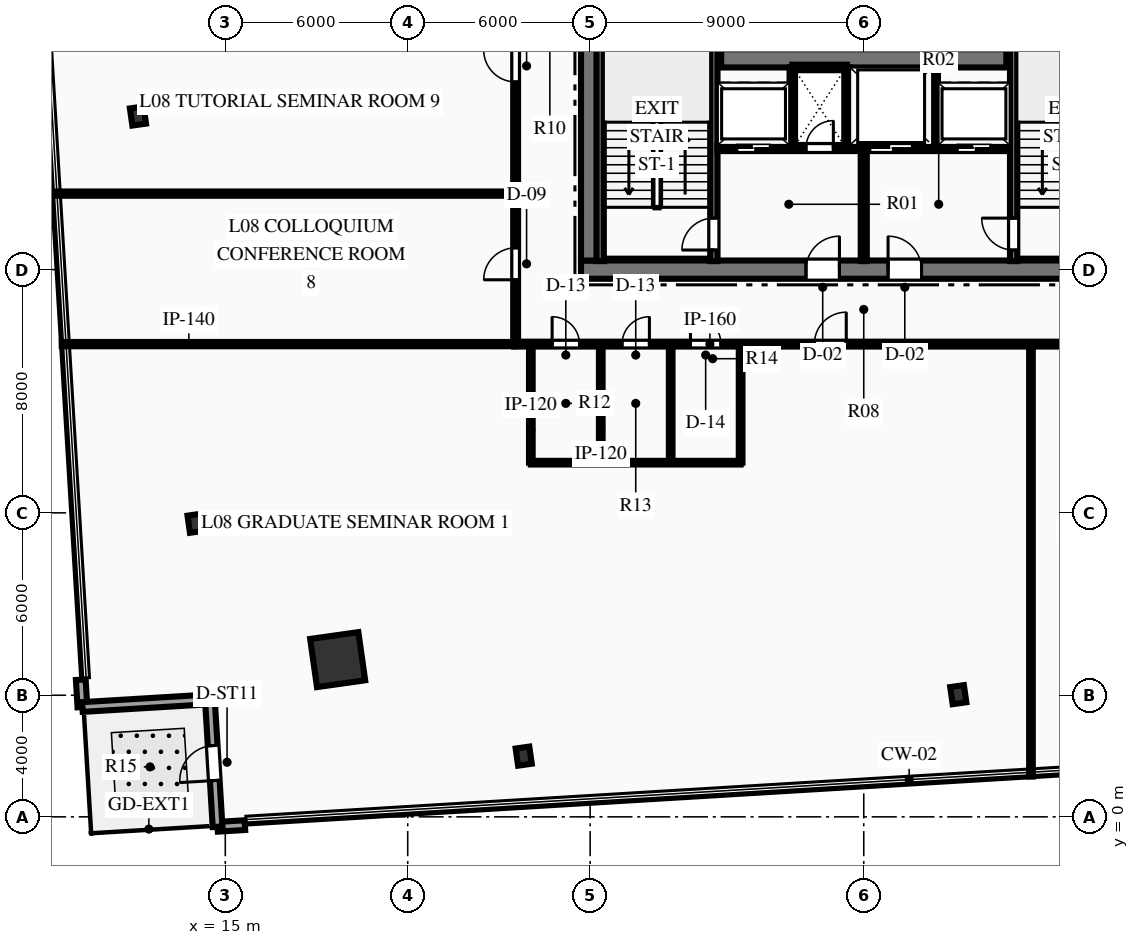
"""IFC4 building model, lengths in metres.
Left out: names, types, materials, properties, quantities, classifications, styles, units other than length and angle.
Written with IfcOpenShell. Run it as: python <this file> out.ifc"""

import sys

from ifc_helpers import new_model, si_unit, direction, frame, frame_2d, origin, origin_2d, place, context, subcontext, project, spatial, rectangle, hollow_rectangle, i_section, extrude, element, fill, save


model = new_model("IFC4")
c1 = context("Model", 3, precision=1e-05, world=origin(), true_north=direction((0.0, 1.0)))
c2 = subcontext(c1, "Body", "Model", "MODEL_VIEW")
j1 = project(units=[si_unit("LENGTHUNIT", "METRE"), si_unit("PLANEANGLEUNIT", "RADIAN")], contexts=[c1])
p1 = place(None, origin())
s1 = spatial("IfcSite", under=j1, at=p1, CompositionType="ELEMENT")
p2 = place(p1, origin())
s2 = spatial("IfcBuilding", under=s1, at=p2, CompositionType="ELEMENT")
p3 = place(p2, frame((0.0, 0.0, 40.2)))
s3 = spatial("IfcBuildingStorey", under=s2, at=p3, CompositionType="ELEMENT", Elevation=40.2)
p4 = place(p3, frame((26.7, 18.0, 0.0), z_axis=(0.0, 0.0, 1.0), x_axis=(1.0, 0.0, 0.0)))
e1 = element("IfcWall", 1, at=p4, inside=s3, PredefinedType="SHEAR", context=c2, shape_type="SweptSolid", body=[
    extrude(rectangle(XDim=18.6, YDim=0.6, at=frame_2d((9.3, 0.0))), origin(), (0.0, 0.0, 1.0), 3.75),
])
p5 = place(p4, frame((7.4, 0.0, 0.0)))
e2 = element("IfcOpeningElement", 2, at=p5, cuts=e1, PredefinedType="OPENING", context=c2, shape_type="SweptSolid", body=[
    extrude(rectangle(XDim=1.1, YDim=2.15, at=frame_2d((0.55, 1.075))), frame((0.0, 0.31, 0.0), z_axis=(0.0, -1.0, 0.0), x_axis=(1.0, 0.0, 0.0)), (0.0, 0.0, 1.0), 0.62),
])
p6 = place(p4, frame((10.1, 0.0, 0.0)))
e3 = element("IfcOpeningElement", 3, at=p6, cuts=e1, PredefinedType="OPENING", context=c2, shape_type="SweptSolid", body=[
    extrude(rectangle(XDim=1.1, YDim=2.15, at=frame_2d((0.55, 1.075))), frame((0.0, 0.31, 0.0), z_axis=(0.0, -1.0, 0.0), x_axis=(1.0, 0.0, 0.0)), (0.0, 0.0, 1.0), 0.62),
])
p7 = place(p3, frame((27.0, 18.3, 0.0), z_axis=(0.0, 0.0, 1.0), x_axis=(0.0, 1.0, 0.0)))
e4 = element("IfcWall", 4, at=p7, inside=s3, PredefinedType="SHEAR", context=c2, shape_type="SweptSolid", body=[
    extrude(rectangle(XDim=15.4, YDim=0.6, at=frame_2d((7.7, 0.0))), origin(), (0.0, 0.0, 1.0), 3.75),
])
p8 = place(p7, frame((9.94, 0.0, 0.0)))
e5 = element("IfcOpeningElement", 5, at=p8, cuts=e4, PredefinedType="OPENING", context=c2, shape_type="SweptSolid", body=[
    extrude(rectangle(XDim=1.4, YDim=2.2, at=frame_2d((0.7, 1.1))), frame((0.0, 0.31, 0.0), z_axis=(0.0, -1.0, 0.0), x_axis=(1.0, 0.0, 0.0)), (0.0, 0.0, 1.0), 0.62),
])
p9 = place(p3, frame((31.31, 24.95, 0.0), z_axis=(0.0, 0.0, 1.0), x_axis=(1.0, 0.0, 0.0)))
e6 = element("IfcWall", 6, at=p9, inside=s3, PredefinedType="SHEAR", context=c2, shape_type="SweptSolid", body=[
    extrude(rectangle(XDim=9.38, YDim=0.6, at=frame_2d((4.69, 0.0))), origin(), (0.0, 0.0, 1.0), 3.75),
])
p10 = place(p3, frame((31.07, 18.28, 0.0), z_axis=(0.0, 0.0, 1.0), x_axis=(0.0, 1.0, 0.0)))
e7 = element("IfcWall", 7, at=p10, inside=s3, PredefinedType="SHEAR", context=c2, shape_type="SweptSolid", body=[
    extrude(rectangle(XDim=8.26, YDim=0.24, at=frame_2d((4.13, 0.0))), origin(), (0.0, 0.0, 1.0), 3.75),
])
p11 = place(p10, frame((0.365, 0.0, 0.0)))
e8 = element("IfcOpeningElement", 8, at=p11, cuts=e7, PredefinedType="OPENING", context=c2, shape_type="SweptSolid", body=[
    extrude(rectangle(XDim=1.05, YDim=2.15, at=frame_2d((0.525, 1.075))), frame((0.0, 0.13, 0.0), z_axis=(0.0, -1.0, 0.0), x_axis=(1.0, 0.0, 0.0)), (0.0, 0.0, 1.0), 0.26),
])
p12 = place(p3, frame((27.33, 18.28, 0.0), z_axis=(0.0, 0.0, 1.0), x_axis=(0.0, 1.0, 0.0)))
e9 = element("IfcWall", 9, at=p12, inside=s3, PredefinedType="SHEAR", context=c2, shape_type="SweptSolid", body=[
    extrude(rectangle(XDim=8.26, YDim=0.24, at=frame_2d((4.13, 0.0))), origin(), (0.0, 0.0, 1.0), 3.75),
])
p13 = place(p3, frame((40.93, 18.28, 0.0), z_axis=(0.0, 0.0, 1.0), x_axis=(0.0, 1.0, 0.0)))
e10 = element("IfcWall", 10, at=p13, inside=s3, PredefinedType="SHEAR", context=c2, shape_type="SweptSolid", body=[
    extrude(rectangle(XDim=8.26, YDim=0.24, at=frame_2d((4.13, 0.0))), origin(), (0.0, 0.0, 1.0), 3.75),
])
p14 = place(p13, frame((0.365, 0.0, 0.0)))
e11 = element("IfcOpeningElement", 11, at=p14, cuts=e10, PredefinedType="OPENING", context=c2, shape_type="SweptSolid", body=[
    extrude(rectangle(XDim=1.05, YDim=2.15, at=frame_2d((0.525, 1.075))), frame((0.0, 0.13, 0.0), z_axis=(0.0, -1.0, 0.0), x_axis=(1.0, 0.0, 0.0)), (0.0, 0.0, 1.0), 0.26),
])
p15 = place(p3, frame((18.696, 5.172, 0.0), z_axis=(0.0, 0.0, 1.0), x_axis=(0.990146240249, 0.140037219771, 0.0)))
e12 = element("IfcColumn", 12, at=p15, inside=s3, PredefinedType="COLUMN", context=c2, shape_type="SweptSolid", body=[
    extrude(hollow_rectangle(XDim=1.6, YDim=1.6, WallThickness=0.08, at=origin_2d()), origin(), (0.0, 0.0, 1.0), 3.75),
])
for number, where, z_axis, x_axis in (
    (13, (24.815, 1.997, 0.0), (0.0, 0.0, 1.0), (0.99, 0.14, 0.0)),
    (14, (39.109, 4.019, 0.0), (0.0, 0.0, 1.0), (0.99, 0.14, 0.0)),
    (15, (12.127, 23.053, 0.0), (0.0, 0.0, 1.0), (0.99, 0.14, 0.0)),
    (16, (14.022, 9.657, 0.0), (0.0, 0.0, 1.0), (0.99, 0.14, 0.0)),
):
    element("IfcColumn", number, at=place(p3, frame(where, z_axis=z_axis, x_axis=x_axis)), inside=s3, PredefinedType="COLUMN", context=c2, shape_type="SweptSolid", body=[
        extrude(i_section(OverallWidth=0.454, OverallDepth=0.569, WebThickness=0.078, FlangeThickness=0.125, at=origin_2d()), origin(), (0.0, 0.0, 1.0), 3.75),
    ])
for number, where, z_axis, x_axis in (
    (17, (15.644, -0.272, 0.0), (0.0, 0.0, 1.0), (-0.998, -0.06, 0.0)),
    (18, (10.301, 3.613, 0.0), (0.0, 0.0, 1.0), (-0.06, 0.998, 0.0)),
):
    element("IfcWall", number, at=place(p3, frame(where, z_axis=z_axis, x_axis=x_axis)), inside=s3, PredefinedType="STANDARD", context=c2, shape_type="SweptSolid", body=[
        extrude(rectangle(XDim=0.9, YDim=0.32, at=frame_2d((0.45, 0.0))), origin(), (0.0, 0.0, 1.0), 3.44),
    ])
p16 = place(p3, frame((14.493, 3.865, 0.0), z_axis=(0.0, 0.0, 1.0), x_axis=(-0.998188544632, -0.060163355677, 0.0)))
e19 = element("IfcWall", 19, at=p16, inside=s3, PredefinedType="STANDARD", context=c2, shape_type="SweptSolid", body=[
    extrude(rectangle(XDim=4.2, YDim=0.32, at=frame_2d((2.1, 0.0))), origin(), (0.0, 0.0, 1.0), 3.44),
])
p17 = place(p3, frame((14.746, -0.327, 0.0), z_axis=(0.0, 0.0, 1.0), x_axis=(-0.060224768245, 0.998184841244, 0.0)))
e20 = element("IfcWall", 20, at=p17, inside=s3, PredefinedType="STANDARD", context=c2, shape_type="SweptSolid", body=[
    extrude(rectangle(XDim=4.2, YDim=0.32, at=frame_2d((2.1, 0.0))), origin(), (0.0, 0.0, 1.0), 3.44),
])
p18 = place(p17, frame((1.525, 0.0, 0.0)))
e21 = element("IfcOpeningElement", 21, at=p18, cuts=e20, PredefinedType="OPENING", context=c2, shape_type="SweptSolid", body=[
    extrude(rectangle(XDim=1.15, YDim=2.2, at=frame_2d((0.575, 1.1))), frame((0.0, 0.17, 0.0), z_axis=(0.0, -1.0, 0.0), x_axis=(1.0, 0.0, 0.0)), (0.0, 0.0, 1.0), 0.34),
])
p19 = place(p3, frame((36.0, 18.28, 0.0), z_axis=(0.0, 0.0, 1.0), x_axis=(0.0, 1.0, 0.0)))
e22 = element("IfcWall", 22, at=p19, inside=s3, PredefinedType="PARTITIONING", context=c2, shape_type="SweptSolid", body=[
    extrude(rectangle(XDim=3.77, YDim=0.2, at=frame_2d((1.885, 0.0))), origin(), (0.0, 0.0, 1.0), 3.44),
])
p20 = place(p3, frame((31.19, 22.0, 0.0), z_axis=(0.0, 0.0, 1.0), x_axis=(1.0, 0.0, 0.0)))
e23 = element("IfcWall", 23, at=p20, inside=s3, PredefinedType="PARTITIONING", context=c2, shape_type="SweptSolid", body=[
    extrude(rectangle(XDim=4.69, YDim=0.2, at=frame_2d((2.345, 0.0))), origin(), (0.0, 0.0, 1.0), 3.44),
])
p21 = place(p20, frame((2.91, 0.0, 0.0)))
e24 = element("IfcOpeningElement", 24, at=p21, cuts=e23, PredefinedType="OPENING", context=c2, shape_type="SweptSolid", body=[
    extrude(rectangle(XDim=0.9, YDim=2.15, at=frame_2d((0.45, 1.075))), frame((0.0, 0.11, 0.0), z_axis=(0.0, -1.0, 0.0), x_axis=(1.0, 0.0, 0.0)), (0.0, 0.0, 1.0), 0.22),
])
p22 = place(p20, frame((0.635, 0.0, 0.0)))
e25 = element("IfcOpeningElement", 25, at=p22, cuts=e23, PredefinedType="OPENING", context=c2, shape_type="SweptSolid", body=[
    extrude(rectangle(XDim=1.1, YDim=2.15, at=frame_2d((0.55, 1.075))), frame((0.0, 0.11, 0.0), z_axis=(0.0, -1.0, 0.0), x_axis=(1.0, 0.0, 0.0)), (0.0, 0.0, 1.0), 0.22),
])
p23 = place(p3, frame((36.12, 22.0, 0.0), z_axis=(0.0, 0.0, 1.0), x_axis=(1.0, 0.0, 0.0)))
e26 = element("IfcWall", 26, at=p23, inside=s3, PredefinedType="PARTITIONING", context=c2, shape_type="SweptSolid", body=[
    extrude(rectangle(XDim=4.69, YDim=0.2, at=frame_2d((2.345, 0.0))), origin(), (0.0, 0.0, 1.0), 3.44),
])
p24 = place(p23, frame((2.955, 0.0, 0.0)))
e27 = element("IfcOpeningElement", 27, at=p24, cuts=e26, PredefinedType="OPENING", context=c2, shape_type="SweptSolid", body=[
    extrude(rectangle(XDim=1.1, YDim=2.15, at=frame_2d((0.55, 1.075))), frame((0.0, 0.11, 0.0), z_axis=(0.0, -1.0, 0.0), x_axis=(1.0, 0.0, 0.0)), (0.0, 0.0, 1.0), 0.22),
])
p25 = place(p23, frame((0.08, 0.0, 0.0)))
e28 = element("IfcOpeningElement", 28, at=p25, cuts=e26, PredefinedType="OPENING", context=c2, shape_type="SweptSolid", body=[
    extrude(rectangle(XDim=1.4, YDim=2.2, at=frame_2d((0.7, 1.1))), frame((0.0, 0.11, 0.0), z_axis=(0.0, -1.0, 0.0), x_axis=(1.0, 0.0, 0.0)), (0.0, 0.0, 1.0), 0.22),
])
for number, where, z_axis, x_axis in (
    (29, (33.65, 22.05, 0.0), (0.0, 0.0, 1.0), (0.0, 1.0, 0.0)),
    (30, (35.45, 22.05, 0.0), (0.0, 0.0, 1.0), (0.0, 1.0, 0.0)),
):
    element("IfcWall", number, at=place(p3, frame(where, z_axis=z_axis, x_axis=x_axis)), inside=s3, PredefinedType="PARTITIONING", context=c2, shape_type="SweptSolid", body=[
        extrude(rectangle(XDim=2.6, YDim=0.18, at=frame_2d((1.3, 0.0))), origin(), (0.0, 0.0, 1.0), 3.44),
    ])
p26 = place(p3, frame((33.65, 24.65, 0.0), z_axis=(0.0, 0.0, 1.0), x_axis=(1.0, 0.0, 0.0)))
e31 = element("IfcWall", 31, at=p26, inside=s3, PredefinedType="PARTITIONING", context=c2, shape_type="SweptSolid", body=[
    extrude(rectangle(XDim=1.8, YDim=0.18, at=frame_2d((0.9, 0.0))), origin(), (0.0, 0.0, 1.0), 3.44),
])
p27 = place(p3, frame((38.35, 22.05, 0.0), z_axis=(0.0, 0.0, 1.0), x_axis=(0.0, 1.0, 0.0)))
e32 = element("IfcWall", 32, at=p27, inside=s3, PredefinedType="PARTITIONING", context=c2, shape_type="SweptSolid", body=[
    extrude(rectangle(XDim=2.6, YDim=0.18, at=frame_2d((1.3, 0.0))), origin(), (0.0, 0.0, 1.0), 3.44),
])
p28 = place(p3, frame((24.5, 15.55, 0.0), z_axis=(0.0, 0.0, 1.0), x_axis=(1.0, 0.0, 0.0)))
e33 = element("IfcWall", 33, at=p28, inside=s3, PredefinedType="PARTITIONING", context=c2, shape_type="SweptSolid", body=[
    extrude(rectangle(XDim=23.0, YDim=0.16, at=frame_2d((11.5, 0.0))), origin(), (0.0, 0.0, 1.0), 3.44),
])
p29 = place(p28, frame((1.25, 0.0, 0.0)))
e34 = element("IfcOpeningElement", 34, at=p29, cuts=e33, PredefinedType="OPENING", context=c2, shape_type="SweptSolid", body=[
    extrude(rectangle(XDim=0.9, YDim=2.15, at=frame_2d((0.45, 1.075))), frame((0.0, 0.09, 0.0), z_axis=(0.0, -1.0, 0.0), x_axis=(1.0, 0.0, 0.0)), (0.0, 0.0, 1.0), 0.18),
])
p30 = place(p28, frame((3.55, 0.0, 0.0)))
e35 = element("IfcOpeningElement", 35, at=p30, cuts=e33, PredefinedType="OPENING", context=c2, shape_type="SweptSolid", body=[
    extrude(rectangle(XDim=0.9, YDim=2.15, at=frame_2d((0.45, 1.075))), frame((0.0, 0.09, 0.0), z_axis=(0.0, -1.0, 0.0), x_axis=(1.0, 0.0, 0.0)), (0.0, 0.0, 1.0), 0.18),
])
p31 = place(p28, frame((5.8, 0.0, 0.0)))
e36 = element("IfcOpeningElement", 36, at=p31, cuts=e33, PredefinedType="OPENING", context=c2, shape_type="SweptSolid", body=[
    extrude(rectangle(XDim=1.0, YDim=2.15, at=frame_2d((0.5, 1.075))), frame((0.0, 0.09, 0.0), z_axis=(0.0, -1.0, 0.0), x_axis=(1.0, 0.0, 0.0)), (0.0, 0.0, 1.0), 0.18),
])
p32 = place(p28, frame((9.875, 0.0, 0.0)))
e37 = element("IfcOpeningElement", 37, at=p32, cuts=e33, PredefinedType="OPENING", context=c2, shape_type="SweptSolid", body=[
    extrude(rectangle(XDim=1.05, YDim=2.15, at=frame_2d((0.525, 1.075))), frame((0.0, 0.09, 0.0), z_axis=(0.0, -1.0, 0.0), x_axis=(1.0, 0.0, 0.0)), (0.0, 0.0, 1.0), 0.18),
])
p33 = place(p28, frame((19.309, 0.0, 0.0)))
e38 = element("IfcOpeningElement", 38, at=p33, cuts=e33, PredefinedType="OPENING", context=c2, shape_type="SweptSolid", body=[
    extrude(rectangle(XDim=1.05, YDim=2.15, at=frame_2d((0.525, 1.075))), frame((0.0, 0.09, 0.0), z_axis=(0.0, -1.0, 0.0), x_axis=(1.0, 0.0, 0.0)), (0.0, 0.0, 1.0), 0.18),
])
p34 = place(p3, frame((24.55, 15.55, 0.0), z_axis=(0.0, 0.0, 1.0), x_axis=(0.0, 1.0, 0.0)))
e39 = element("IfcWall", 39, at=p34, inside=s3, PredefinedType="PARTITIONING", context=c2, shape_type="SweptSolid", body=[
    extrude(rectangle(XDim=20.9, YDim=0.16, at=frame_2d((10.45, 0.0))), origin(), (0.0, 0.0, 1.0), 3.44),
])
p35 = place(p34, frame((2.116, 0.0, 0.0)))
e40 = element("IfcOpeningElement", 40, at=p35, cuts=e39, PredefinedType="OPENING", context=c2, shape_type="SweptSolid", body=[
    extrude(rectangle(XDim=1.05, YDim=2.15, at=frame_2d((0.525, 1.075))), frame((0.0, 0.09, 0.0), z_axis=(0.0, -1.0, 0.0), x_axis=(1.0, 0.0, 0.0)), (0.0, 0.0, 1.0), 0.18),
])
p36 = place(p34, frame((8.625, 0.0, 0.0)))
e41 = element("IfcOpeningElement", 41, at=p36, cuts=e39, PredefinedType="OPENING", context=c2, shape_type="SweptSolid", body=[
    extrude(rectangle(XDim=1.05, YDim=2.15, at=frame_2d((0.525, 1.075))), frame((0.0, 0.09, 0.0), z_axis=(0.0, -1.0, 0.0), x_axis=(1.0, 0.0, 0.0)), (0.0, 0.0, 1.0), 0.18),
])
p37 = place(p34, frame((13.945, 0.0, 0.0)))
e42 = element("IfcOpeningElement", 42, at=p37, cuts=e39, PredefinedType="OPENING", context=c2, shape_type="SweptSolid", body=[
    extrude(rectangle(XDim=1.05, YDim=2.15, at=frame_2d((0.525, 1.075))), frame((0.0, 0.09, 0.0), z_axis=(0.0, -1.0, 0.0), x_axis=(1.0, 0.0, 0.0)), (0.0, 0.0, 1.0), 0.18),
])
p38 = place(p34, frame((16.783, 0.0, 0.0)))
e43 = element("IfcOpeningElement", 43, at=p38, cuts=e39, PredefinedType="OPENING", context=c2, shape_type="SweptSolid", body=[
    extrude(rectangle(XDim=1.05, YDim=2.15, at=frame_2d((0.525, 1.075))), frame((0.0, 0.09, 0.0), z_axis=(0.0, -1.0, 0.0), x_axis=(1.0, 0.0, 0.0)), (0.0, 0.0, 1.0), 0.18),
])
for number, where, z_axis, x_axis in (
    (44, (25.05, 11.65, 0.0), (0.0, 0.0, 1.0), (0.0, 1.0, 0.0)),
    (45, (27.35, 11.65, 0.0), (0.0, 0.0, 1.0), (0.0, 1.0, 0.0)),
    (46, (29.65, 11.65, 0.0), (0.0, 0.0, 1.0), (0.0, 1.0, 0.0)),
    (47, (31.95, 11.65, 0.0), (0.0, 0.0, 1.0), (0.0, 1.0, 0.0)),
):
    element("IfcWall", number, at=place(p3, frame(where, z_axis=z_axis, x_axis=x_axis)), inside=s3, PredefinedType="PARTITIONING", context=c2, shape_type="SweptSolid", body=[
        extrude(rectangle(XDim=3.9, YDim=0.12, at=frame_2d((1.95, 0.0))), origin(), (0.0, 0.0, 1.0), 3.44),
    ])
p39 = place(p3, frame((25.05, 11.65, 0.0), z_axis=(0.0, 0.0, 1.0), x_axis=(1.0, 0.0, 0.0)))
e48 = element("IfcWall", 48, at=p39, inside=s3, PredefinedType="PARTITIONING", context=c2, shape_type="SweptSolid", body=[
    extrude(rectangle(XDim=6.9, YDim=0.12, at=frame_2d((3.45, 0.0))), origin(), (0.0, 0.0, 1.0), 3.44),
])
p40 = place(p3, frame((9.621, 15.55, 0.0), z_axis=(0.0, 0.0, 1.0), x_axis=(1.0, 0.0, 0.0)))
e49 = element("IfcWall", 49, at=p40, inside=s3, PredefinedType="PARTITIONING", context=c2, shape_type="SweptSolid", body=[
    extrude(rectangle(XDim=14.929, YDim=0.14, at=frame_2d((7.464, 0.0))), origin(), (0.0, 0.0, 1.0), 3.44),
])
p41 = place(p3, frame((41.5, 1.326, 0.0), z_axis=(0.0, 0.0, 1.0), x_axis=(0.0, 1.0, 0.0)))
e50 = element("IfcWall", 50, at=p41, inside=s3, PredefinedType="PARTITIONING", context=c2, shape_type="SweptSolid", body=[
    extrude(rectangle(XDim=14.224, YDim=0.12, at=frame_2d((7.112, 0.0))), origin(), (0.0, 0.0, 1.0), 3.44),
])
p42 = place(p3, frame((9.323, 20.5, 0.0), z_axis=(0.0, 0.0, 1.0), x_axis=(1.0, 0.0, 0.0)))
e51 = element("IfcWall", 51, at=p42, inside=s3, PredefinedType="PARTITIONING", context=c2, shape_type="SweptSolid", body=[
    extrude(rectangle(XDim=15.228, YDim=0.14, at=frame_2d((7.614, 0.0))), origin(), (0.0, 0.0, 1.0), 3.44),
])
p43 = place(p18, origin())
e52 = element("IfcDoor", 52, at=p43, inside=s3, OperationType="SINGLE_SWING_LEFT", PredefinedType="DOOR", context=c2, shape_type="SweptSolid", body=[
    extrude(rectangle(XDim=1.15, YDim=2.2, at=frame_2d((0.575, 1.1))), frame((0.0, 0.025, 0.0), z_axis=(0.0, -1.0, 0.0), x_axis=(1.0, 0.0, 0.0)), (0.0, 0.0, 1.0), 0.05),
])
fill(e21, e52)
p44 = place(p11, origin())
e53 = element("IfcDoor", 53, at=p44, inside=s3, OperationType="SINGLE_SWING_LEFT", PredefinedType="DOOR", context=c2, shape_type="SweptSolid", body=[
    extrude(rectangle(XDim=1.05, YDim=2.15, at=frame_2d((0.525, 1.075))), frame((0.0, 0.025, 0.0), z_axis=(0.0, -1.0, 0.0), x_axis=(1.0, 0.0, 0.0)), (0.0, 0.0, 1.0), 0.05),
])
fill(e8, e53)
p45 = place(p14, origin())
e54 = element("IfcDoor", 54, at=p45, inside=s3, OperationType="SINGLE_SWING_RIGHT", PredefinedType="DOOR", context=c2, shape_type="SweptSolid", body=[
    extrude(rectangle(XDim=1.05, YDim=2.15, at=frame_2d((0.525, 1.075))), frame((0.0, 0.025, 0.0), z_axis=(0.0, -1.0, 0.0), x_axis=(1.0, 0.0, 0.0)), (0.0, 0.0, 1.0), 0.05),
])
fill(e11, e54)
p46 = place(p5, origin())
e55 = element("IfcDoor", 55, at=p46, inside=s3, OperationType="SINGLE_SWING_RIGHT", PredefinedType="DOOR", context=c2, shape_type="SweptSolid", body=[
    extrude(rectangle(XDim=1.1, YDim=2.15, at=frame_2d((0.55, 1.075))), frame((0.0, 0.025, 0.0), z_axis=(0.0, -1.0, 0.0), x_axis=(1.0, 0.0, 0.0)), (0.0, 0.0, 1.0), 0.05),
])
fill(e2, e55)
p47 = place(p6, origin())
e56 = element("IfcDoor", 56, at=p47, inside=s3, OperationType="SINGLE_SWING_LEFT", PredefinedType="DOOR", context=c2, shape_type="SweptSolid", body=[
    extrude(rectangle(XDim=1.1, YDim=2.15, at=frame_2d((0.55, 1.075))), frame((0.0, 0.025, 0.0), z_axis=(0.0, -1.0, 0.0), x_axis=(1.0, 0.0, 0.0)), (0.0, 0.0, 1.0), 0.05),
])
fill(e3, e56)
p48 = place(p21, origin())
e57 = element("IfcDoor", 57, at=p48, inside=s3, OperationType="SINGLE_SWING_RIGHT", PredefinedType="DOOR", context=c2, shape_type="SweptSolid", body=[
    extrude(rectangle(XDim=0.9, YDim=2.15, at=frame_2d((0.45, 1.075))), frame((0.0, 0.025, 0.0), z_axis=(0.0, -1.0, 0.0), x_axis=(1.0, 0.0, 0.0)), (0.0, 0.0, 1.0), 0.05),
])
fill(e24, e57)
p49 = place(p29, origin())
e58 = element("IfcDoor", 58, at=p49, inside=s3, OperationType="SINGLE_SWING_LEFT", PredefinedType="DOOR", context=c2, shape_type="SweptSolid", body=[
    extrude(rectangle(XDim=0.9, YDim=2.15, at=frame_2d((0.45, 1.075))), frame((0.0, 0.025, 0.0), z_axis=(0.0, -1.0, 0.0), x_axis=(1.0, 0.0, 0.0)), (0.0, 0.0, 1.0), 0.05),
])
fill(e34, e58)
p50 = place(p30, origin())
e59 = element("IfcDoor", 59, at=p50, inside=s3, OperationType="SINGLE_SWING_RIGHT", PredefinedType="DOOR", context=c2, shape_type="SweptSolid", body=[
    extrude(rectangle(XDim=0.9, YDim=2.15, at=frame_2d((0.45, 1.075))), frame((0.0, 0.025, 0.0), z_axis=(0.0, -1.0, 0.0), x_axis=(1.0, 0.0, 0.0)), (0.0, 0.0, 1.0), 0.05),
])
fill(e35, e59)
p51 = place(p31, origin())
e60 = element("IfcDoor", 60, at=p51, inside=s3, OperationType="SINGLE_SWING_LEFT", PredefinedType="DOOR", context=c2, shape_type="SweptSolid", body=[
    extrude(rectangle(XDim=1.0, YDim=2.15, at=frame_2d((0.5, 1.075))), frame((0.0, 0.025, 0.0), z_axis=(0.0, -1.0, 0.0), x_axis=(1.0, 0.0, 0.0)), (0.0, 0.0, 1.0), 0.05),
])
fill(e36, e60)
p52 = place(p32, origin())
e61 = element("IfcDoor", 61, at=p52, inside=s3, OperationType="SINGLE_SWING_RIGHT", PredefinedType="DOOR", context=c2, shape_type="SweptSolid", body=[
    extrude(rectangle(XDim=1.05, YDim=2.15, at=frame_2d((0.525, 1.075))), frame((0.0, 0.025, 0.0), z_axis=(0.0, -1.0, 0.0), x_axis=(1.0, 0.0, 0.0)), (0.0, 0.0, 1.0), 0.05),
])
fill(e37, e61)
p53 = place(p35, origin())
e62 = element("IfcDoor", 62, at=p53, inside=s3, OperationType="SINGLE_SWING_LEFT", PredefinedType="DOOR", context=c2, shape_type="SweptSolid", body=[
    extrude(rectangle(XDim=1.05, YDim=2.15, at=frame_2d((0.525, 1.075))), frame((0.0, 0.025, 0.0), z_axis=(0.0, -1.0, 0.0), x_axis=(1.0, 0.0, 0.0)), (0.0, 0.0, 1.0), 0.05),
])
fill(e40, e62)
p54 = place(p36, origin())
e63 = element("IfcDoor", 63, at=p54, inside=s3, OperationType="SINGLE_SWING_RIGHT", PredefinedType="DOOR", context=c2, shape_type="SweptSolid", body=[
    extrude(rectangle(XDim=1.05, YDim=2.15, at=frame_2d((0.525, 1.075))), frame((0.0, 0.025, 0.0), z_axis=(0.0, -1.0, 0.0), x_axis=(1.0, 0.0, 0.0)), (0.0, 0.0, 1.0), 0.05),
])
fill(e41, e63)
p55 = place(p22, origin())
e64 = element("IfcDoor", 64, at=p55, inside=s3, OperationType="SLIDING_TO_LEFT", PredefinedType="DOOR", context=c2, shape_type="SweptSolid", body=[
    extrude(rectangle(XDim=1.1, YDim=2.15, at=frame_2d((0.55, 1.075))), frame((0.0, 0.025, 0.0), z_axis=(0.0, -1.0, 0.0), x_axis=(1.0, 0.0, 0.0)), (0.0, 0.0, 1.0), 0.05),
])
fill(e25, e64)
p56 = place(p24, origin())
e65 = element("IfcDoor", 65, at=p56, inside=s3, OperationType="SLIDING_TO_LEFT", PredefinedType="DOOR", context=c2, shape_type="SweptSolid", body=[
    extrude(rectangle(XDim=1.1, YDim=2.15, at=frame_2d((0.55, 1.075))), frame((0.0, 0.025, 0.0), z_axis=(0.0, -1.0, 0.0), x_axis=(1.0, 0.0, 0.0)), (0.0, 0.0, 1.0), 0.05),
])
fill(e27, e65)
p57 = place(p25, origin())
e66 = element("IfcDoor", 66, at=p57, inside=s3, OperationType="SLIDING_TO_LEFT", PredefinedType="DOOR", context=c2, shape_type="SweptSolid", body=[
    extrude(rectangle(XDim=1.4, YDim=2.2, at=frame_2d((0.7, 1.1))), frame((0.0, 0.025, 0.0), z_axis=(0.0, -1.0, 0.0), x_axis=(1.0, 0.0, 0.0)), (0.0, 0.0, 1.0), 0.05),
])
fill(e28, e66)
save(model, sys.argv[1])
